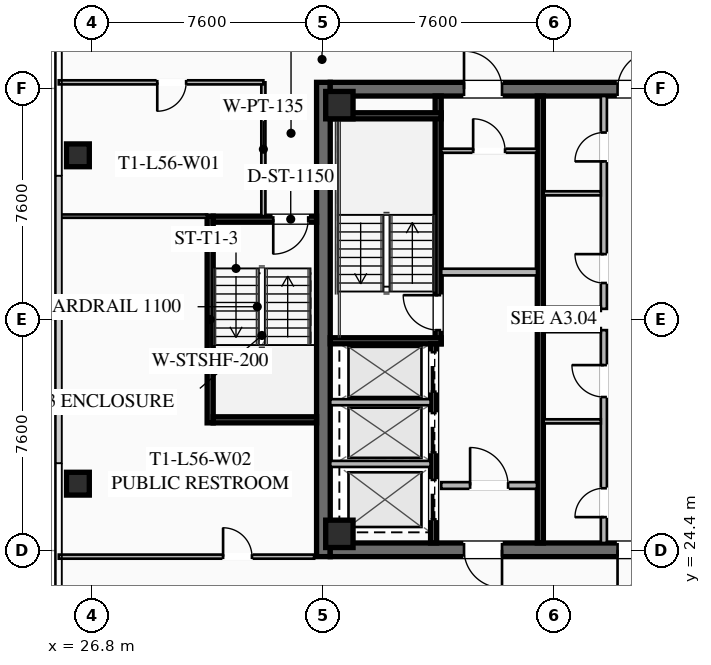
"""IFC4 building model, lengths in metres.
Left out: names, types, materials, properties, quantities, classifications, styles, units other than length and angle.
Written with IfcOpenShell. Run it as: python <this file> out.ifc"""

import sys

from ifc_helpers import new_model, si_unit, direction, frame, frame_2d, origin, origin_2d, place, context, subcontext, project, spatial, rectangle, hollow_rectangle, extrude, element, fill, save


model = new_model("IFC4")
c1 = context("Model", 3, precision=1e-05, world=origin(), true_north=direction((0.0, 1.0)))
c2 = subcontext(c1, "Body", "Model", "MODEL_VIEW")
j1 = project(units=[si_unit("LENGTHUNIT", "METRE"), si_unit("PLANEANGLEUNIT", "RADIAN")], contexts=[c1])
p1 = place(None, origin())
s1 = spatial("IfcSite", under=j1, at=p1, CompositionType="ELEMENT")
p2 = place(p1, origin())
s2 = spatial("IfcBuilding", under=s1, at=p2, CompositionType="ELEMENT")
p3 = place(p2, frame((0.0, 0.0, 207.75)))
s3 = spatial("IfcBuildingStorey", under=s2, at=p3, CompositionType="ELEMENT", Elevation=207.75)
p4 = place(p3, frame((34.425, 24.2, 0.0), z_axis=(0.0, 0.0, 1.0), x_axis=(0.0, 1.0, 0.0)))
e1 = element("IfcWall", 1, at=p4, inside=s3, PredefinedType="SHEAR", context=c2, shape_type="SweptSolid", body=[
    extrude(rectangle(XDim=15.6, YDim=0.45, at=frame_2d((7.8, 0.0))), origin(), (0.0, 0.0, 1.0), 3.55),
])
p5 = place(p3, frame((49.35, 24.425, 0.0), z_axis=(0.0, 0.0, 1.0), x_axis=(-1.0, 0.0, 0.0)))
e2 = element("IfcWall", 2, at=p5, inside=s3, PredefinedType="SHEAR", context=c2, shape_type="SweptSolid", body=[
    extrude(rectangle(XDim=14.7, YDim=0.45, at=frame_2d((7.35, 0.0))), origin(), (0.0, 0.0, 1.0), 3.55),
])
p6 = place(p5, frame((9.05, 0.0, 0.0)))
e3 = element("IfcOpeningElement", 3, at=p6, cuts=e2, PredefinedType="OPENING", context=c2, shape_type="SweptSolid", body=[
    extrude(rectangle(XDim=1.25, YDim=2.25, at=frame_2d((0.625, 1.125))), frame((0.0, 0.235, 0.0), z_axis=(0.0, -1.0, 0.0), x_axis=(1.0, 0.0, 0.0)), (0.0, 0.0, 1.0), 0.47),
])
p7 = place(p5, frame((4.0, 0.0, 0.0)))
e4 = element("IfcOpeningElement", 4, at=p7, cuts=e2, PredefinedType="OPENING", context=c2, shape_type="SweptSolid", body=[
    extrude(rectangle(XDim=1.25, YDim=2.25, at=frame_2d((0.625, 1.125))), frame((0.0, 0.235, 0.0), z_axis=(0.0, -1.0, 0.0), x_axis=(1.0, 0.0, 0.0)), (0.0, 0.0, 1.0), 0.47),
])
p8 = place(p3, frame((34.65, 39.575, 0.0), z_axis=(0.0, 0.0, 1.0), x_axis=(1.0, 0.0, 0.0)))
e5 = element("IfcWall", 5, at=p8, inside=s3, PredefinedType="SHEAR", context=c2, shape_type="SweptSolid", body=[
    extrude(rectangle(XDim=14.7, YDim=0.45, at=frame_2d((7.35, 0.0))), origin(), (0.0, 0.0, 1.0), 3.55),
])
p9 = place(p8, frame((4.4, 0.0, 0.0)))
e6 = element("IfcOpeningElement", 6, at=p9, cuts=e5, PredefinedType="OPENING", context=c2, shape_type="SweptSolid", body=[
    extrude(rectangle(XDim=1.25, YDim=2.25, at=frame_2d((0.625, 1.125))), frame((0.0, 0.235, 0.0), z_axis=(0.0, -1.0, 0.0), x_axis=(1.0, 0.0, 0.0)), (0.0, 0.0, 1.0), 0.47),
])
p10 = place(p8, frame((9.45, 0.0, 0.0)))
e7 = element("IfcOpeningElement", 7, at=p10, cuts=e5, PredefinedType="OPENING", context=c2, shape_type="SweptSolid", body=[
    extrude(rectangle(XDim=1.25, YDim=2.25, at=frame_2d((0.625, 1.125))), frame((0.0, 0.235, 0.0), z_axis=(0.0, -1.0, 0.0), x_axis=(1.0, 0.0, 0.0)), (0.0, 0.0, 1.0), 0.47),
])
for number, where, z_axis, x_axis in (
    (8, (34.95, 24.95, 0.0), (0.0, 0.0, 1.0), (1.0, 0.0, 0.0)),
    (9, (34.95, 39.05, 0.0), (0.0, 0.0, 1.0), (1.0, 0.0, 0.0)),
):
    element("IfcColumn", number, at=place(p3, frame(where, z_axis=z_axis, x_axis=x_axis)), inside=s3, PredefinedType="COLUMN", context=c2, shape_type="SweptSolid", body=[
        extrude(hollow_rectangle(XDim=0.9, YDim=0.9, WallThickness=0.04, at=origin_2d()), origin(), (0.0, 0.0, 1.0), 3.37),
    ])
for number, where, z_axis, x_axis in (
    (10, (26.35, 37.4, 0.0), (0.0, 0.0, 1.0), (1.0, 0.0, 0.0)),
    (11, (26.35, 26.6, 0.0), (0.0, 0.0, 1.0), (1.0, 0.0, 0.0)),
):
    element("IfcColumn", number, at=place(p3, frame(where, z_axis=z_axis, x_axis=x_axis)), inside=s3, PredefinedType="COLUMN", context=c2, shape_type="SweptSolid", body=[
        extrude(hollow_rectangle(XDim=0.75, YDim=0.75, WallThickness=0.032, at=origin_2d()), origin(), (0.0, 0.0, 1.0), 3.37),
    ])
p11 = place(p3, frame((38.2, 31.2, 0.0), z_axis=(0.0, 0.0, 1.0), x_axis=(0.0, 1.0, 0.0)))
e12 = element("IfcWall", 12, at=p11, inside=s3, PredefinedType="SHEAR", context=c2, shape_type="SweptSolid", body=[
    extrude(rectangle(XDim=8.15, YDim=0.2, at=frame_2d((4.075, 0.0))), origin(), (0.0, 0.0, 1.0), 3.37),
])
p12 = place(p11, frame((0.45, 0.0, 0.0)))
e13 = element("IfcOpeningElement", 13, at=p12, cuts=e12, PredefinedType="OPENING", context=c2, shape_type="SweptSolid", body=[
    extrude(rectangle(XDim=1.15, YDim=2.2, at=frame_2d((0.575, 1.1))), frame((0.0, 0.11, 0.0), z_axis=(0.0, -1.0, 0.0), x_axis=(1.0, 0.0, 0.0)), (0.0, 0.0, 1.0), 0.22),
])
for number, where, z_axis, x_axis in (
    (14, (34.65, 31.3, 0.0), (0.0, 0.0, 1.0), (1.0, 0.0, 0.0)),
    (15, (34.65, 38.7, 0.0), (0.0, 0.0, 1.0), (1.0, 0.0, 0.0)),
):
    element("IfcWall", number, at=place(p3, frame(where, z_axis=z_axis, x_axis=x_axis)), inside=s3, PredefinedType="SHEAR", context=c2, shape_type="SweptSolid", body=[
        extrude(rectangle(XDim=3.65, YDim=0.2, at=frame_2d((1.825, 0.0))), origin(), (0.0, 0.0, 1.0), 3.37),
    ])
p13 = place(p3, frame((41.56, 24.65, 0.0), z_axis=(0.0, 0.0, 1.0), x_axis=(0.0, 1.0, 0.0)))
e16 = element("IfcWall", 16, at=p13, inside=s3, PredefinedType="SHEAR", context=c2, shape_type="SweptSolid", body=[
    extrude(rectangle(XDim=14.7, YDim=0.2, at=frame_2d((7.35, 0.0))), origin(), (0.0, 0.0, 1.0), 3.37),
])
p14 = place(p3, frame((38.3, 33.56, 0.0), z_axis=(0.0, 0.0, 1.0), x_axis=(1.0, 0.0, 0.0)))
e17 = element("IfcWall", 17, at=p14, inside=s3, PredefinedType="SOLIDWALL", context=c2, shape_type="SweptSolid", body=[
    extrude(rectangle(XDim=3.15, YDim=0.22, at=frame_2d((1.575, 0.0))), origin(), (0.0, 0.0, 1.0), 2.723),
])
p15 = place(p3, frame((38.3, 26.54, 0.0), z_axis=(0.0, 0.0, 1.0), x_axis=(1.0, 0.0, 0.0)))
e18 = element("IfcWall", 18, at=p15, inside=s3, PredefinedType="SOLIDWALL", context=c2, shape_type="SweptSolid", body=[
    extrude(rectangle(XDim=3.15, YDim=0.22, at=frame_2d((1.575, 0.0))), origin(), (0.0, 0.0, 1.0), 2.723),
])
p16 = place(p15, frame((0.95, 0.0, 0.0)))
e19 = element("IfcOpeningElement", 19, at=p16, cuts=e18, PredefinedType="OPENING", context=c2, shape_type="SweptSolid", body=[
    extrude(rectangle(XDim=1.25, YDim=2.25, at=frame_2d((0.625, 1.125))), frame((0.0, 0.12, 0.0), z_axis=(0.0, -1.0, 0.0), x_axis=(1.0, 0.0, 0.0)), (0.0, 0.0, 1.0), 0.24),
])
p17 = place(p3, frame((38.05, 24.65, 0.0), z_axis=(0.0, 0.0, 1.0), x_axis=(0.0, 1.0, 0.0)))
e20 = element("IfcWall", 20, at=p17, inside=s3, PredefinedType="SHEAR", context=c2, shape_type="SweptSolid", body=[
    extrude(rectangle(XDim=6.55, YDim=0.2, at=frame_2d((3.275, 0.0))), origin(), (0.0, 0.0, 1.0), 3.37),
])
p18 = place(p17, frame((4.975, 0.0, 0.0)))
e21 = element("IfcOpeningElement", 21, at=p18, cuts=e20, PredefinedType="OPENING", context=c2, shape_type="SweptSolid", body=[
    extrude(rectangle(XDim=1.3, YDim=2.25, at=frame_2d((0.65, 1.125))), frame((0.0, 0.11, 0.0), z_axis=(0.0, -1.0, 0.0), x_axis=(1.0, 0.0, 0.0)), (0.0, 0.0, 1.0), 0.22),
])
p19 = place(p17, frame((2.975, 0.0, 0.0)))
e22 = element("IfcOpeningElement", 22, at=p19, cuts=e20, PredefinedType="OPENING", context=c2, shape_type="SweptSolid", body=[
    extrude(rectangle(XDim=1.3, YDim=2.25, at=frame_2d((0.65, 1.125))), frame((0.0, 0.11, 0.0), z_axis=(0.0, -1.0, 0.0), x_axis=(1.0, 0.0, 0.0)), (0.0, 0.0, 1.0), 0.22),
])
p20 = place(p17, frame((0.775, 0.0, 0.0)))
e23 = element("IfcOpeningElement", 23, at=p20, cuts=e20, PredefinedType="OPENING", context=c2, shape_type="SweptSolid", body=[
    extrude(rectangle(XDim=1.3, YDim=2.25, at=frame_2d((0.65, 1.125))), frame((0.0, 0.11, 0.0), z_axis=(0.0, -1.0, 0.0), x_axis=(1.0, 0.0, 0.0)), (0.0, 0.0, 1.0), 0.22),
])
for number, where, z_axis, x_axis in (
    (24, (34.65, 27.25, 0.0), (0.0, 0.0, 1.0), (1.0, 0.0, 0.0)),
    (25, (34.65, 29.28, 0.0), (0.0, 0.0, 1.0), (1.0, 0.0, 0.0)),
):
    element("IfcWall", number, at=place(p3, frame(where, z_axis=z_axis, x_axis=x_axis)), inside=s3, PredefinedType="SOLIDWALL", context=c2, shape_type="SweptSolid", body=[
        extrude(rectangle(XDim=3.3, YDim=0.2, at=frame_2d((1.65, 0.0))), origin(), (0.0, 0.0, 1.0), 3.37),
    ])
p21 = place(p3, frame((38.3, 37.55, 0.0), z_axis=(0.0, 0.0, 1.0), x_axis=(1.0, 0.0, 0.0)))
e26 = element("IfcWall", 26, at=p21, inside=s3, PredefinedType="PARTITIONING", context=c2, shape_type="SweptSolid", body=[
    extrude(rectangle(XDim=3.15, YDim=0.135, at=frame_2d((1.575, 0.0))), origin(), (0.0, 0.0, 1.0), 2.723),
])
p22 = place(p21, frame((1.05, 0.0, 0.0)))
e27 = element("IfcOpeningElement", 27, at=p22, cuts=e26, PredefinedType="OPENING", context=c2, shape_type="SweptSolid", body=[
    extrude(rectangle(XDim=1.05, YDim=2.2, at=frame_2d((0.525, 1.1))), frame((0.0, 0.077, 0.0), z_axis=(0.0, -1.0, 0.0), x_axis=(1.0, 0.0, 0.0)), (0.0, 0.0, 1.0), 0.155),
])
p23 = place(p3, frame((43.65, 24.65, 0.0), z_axis=(0.0, 0.0, 1.0), x_axis=(0.0, 1.0, 0.0)))
e28 = element("IfcWall", 28, at=p23, inside=s3, PredefinedType="SOLIDWALL", context=c2, shape_type="SweptSolid", body=[
    extrude(rectangle(XDim=7.0, YDim=0.2, at=frame_2d((3.5, 0.0))), origin(), (0.0, 0.0, 1.0), 2.723),
])
p24 = place(p23, frame((0.85, 0.0, 0.0)))
e29 = element("IfcOpeningElement", 29, at=p24, cuts=e28, PredefinedType="OPENING", context=c2, shape_type="SweptSolid", body=[
    extrude(rectangle(XDim=0.95, YDim=2.05, at=frame_2d((0.475, 1.025))), frame((0.0, 0.11, 0.0), z_axis=(0.0, -1.0, 0.0), x_axis=(1.0, 0.0, 0.0)), (0.0, 0.0, 1.0), 0.22),
])
p25 = place(p23, frame((4.8, 0.0, 0.0)))
e30 = element("IfcOpeningElement", 30, at=p25, cuts=e28, PredefinedType="OPENING", context=c2, shape_type="SweptSolid", body=[
    extrude(rectangle(XDim=1.05, YDim=2.2, at=frame_2d((0.525, 1.1))), frame((0.0, 0.11, 0.0), z_axis=(0.0, -1.0, 0.0), x_axis=(1.0, 0.0, 0.0)), (0.0, 0.0, 1.0), 0.22),
])
for number, where, z_axis, x_axis in (
    (31, (41.67, 31.65, 0.0), (0.0, 0.0, 1.0), (1.0, 0.0, 0.0)),
    (32, (41.67, 28.65, 0.0), (0.0, 0.0, 1.0), (1.0, 0.0, 0.0)),
):
    element("IfcWall", number, at=place(p3, frame(where, z_axis=z_axis, x_axis=x_axis)), inside=s3, PredefinedType="PARTITIONING", context=c2, shape_type="SweptSolid", body=[
        extrude(rectangle(XDim=1.88, YDim=0.135, at=frame_2d((0.94, 0.0))), origin(), (0.0, 0.0, 1.0), 2.723),
    ])
p26 = place(p3, frame((43.65, 32.35, 0.0), z_axis=(0.0, 0.0, 1.0), x_axis=(0.0, 1.0, 0.0)))
e33 = element("IfcWall", 33, at=p26, inside=s3, PredefinedType="SOLIDWALL", context=c2, shape_type="SweptSolid", body=[
    extrude(rectangle(XDim=7.0, YDim=0.2, at=frame_2d((3.5, 0.0))), origin(), (0.0, 0.0, 1.0), 2.723),
])
p27 = place(p26, frame((0.85, 0.0, 0.0)))
e34 = element("IfcOpeningElement", 34, at=p27, cuts=e33, PredefinedType="OPENING", context=c2, shape_type="SweptSolid", body=[
    extrude(rectangle(XDim=0.95, YDim=2.05, at=frame_2d((0.475, 1.025))), frame((0.0, 0.11, 0.0), z_axis=(0.0, -1.0, 0.0), x_axis=(1.0, 0.0, 0.0)), (0.0, 0.0, 1.0), 0.22),
])
p28 = place(p26, frame((4.85, 0.0, 0.0)))
e35 = element("IfcOpeningElement", 35, at=p28, cuts=e33, PredefinedType="OPENING", context=c2, shape_type="SweptSolid", body=[
    extrude(rectangle(XDim=0.95, YDim=2.05, at=frame_2d((0.475, 1.025))), frame((0.0, 0.11, 0.0), z_axis=(0.0, -1.0, 0.0), x_axis=(1.0, 0.0, 0.0)), (0.0, 0.0, 1.0), 0.22),
])
for number, where, z_axis, x_axis in (
    (36, (41.67, 32.35, 0.0), (0.0, 0.0, 1.0), (1.0, 0.0, 0.0)),
    (37, (41.67, 36.15, 0.0), (0.0, 0.0, 1.0), (1.0, 0.0, 0.0)),
):
    element("IfcWall", number, at=place(p3, frame(where, z_axis=z_axis, x_axis=x_axis)), inside=s3, PredefinedType="PARTITIONING", context=c2, shape_type="SweptSolid", body=[
        extrude(rectangle(XDim=1.88, YDim=0.135, at=frame_2d((0.94, 0.0))), origin(), (0.0, 0.0, 1.0), 2.723),
    ])
p29 = place(p3, frame((30.7, 28.6, 0.0), z_axis=(0.0, 0.0, 1.0), x_axis=(0.0, 1.0, 0.0)))
e38 = element("IfcWall", 38, at=p29, inside=s3, PredefinedType="SHEAR", context=c2, shape_type="SweptSolid", body=[
    extrude(rectangle(XDim=6.8, YDim=0.2, at=frame_2d((3.4, 0.0))), origin(), (0.0, 0.0, 1.0), 3.37),
])
p30 = place(p3, frame((34.2, 35.3, 0.0), z_axis=(0.0, 0.0, 1.0), x_axis=(-1.0, 0.0, 0.0)))
e39 = element("IfcWall", 39, at=p30, inside=s3, PredefinedType="SHEAR", context=c2, shape_type="SweptSolid", body=[
    extrude(rectangle(XDim=3.4, YDim=0.2, at=frame_2d((1.7, 0.0))), origin(), (0.0, 0.0, 1.0), 3.37),
])
p31 = place(p30, frame((0.275, 0.0, 0.0)))
e40 = element("IfcOpeningElement", 40, at=p31, cuts=e39, PredefinedType="OPENING", context=c2, shape_type="SweptSolid", body=[
    extrude(rectangle(XDim=1.15, YDim=2.2, at=frame_2d((0.575, 1.1))), frame((0.0, 0.11, 0.0), z_axis=(0.0, -1.0, 0.0), x_axis=(1.0, 0.0, 0.0)), (0.0, 0.0, 1.0), 0.22),
])
p32 = place(p3, frame((30.8, 28.7, 0.0), z_axis=(0.0, 0.0, 1.0), x_axis=(1.0, 0.0, 0.0)))
e41 = element("IfcWall", 41, at=p32, inside=s3, PredefinedType="SHEAR", context=c2, shape_type="SweptSolid", body=[
    extrude(rectangle(XDim=3.4, YDim=0.2, at=frame_2d((1.7, 0.0))), origin(), (0.0, 0.0, 1.0), 3.37),
])
p33 = place(p3, frame((32.45, 35.4, 0.0), z_axis=(0.0, 0.0, 1.0), x_axis=(0.0, 1.0, 0.0)))
e42 = element("IfcWall", 42, at=p33, inside=s3, PredefinedType="PARTITIONING", context=c2, shape_type="SweptSolid", body=[
    extrude(rectangle(XDim=4.4, YDim=0.135, at=frame_2d((2.2, 0.0))), origin(), (0.0, 0.0, 1.0), 2.723),
])
p34 = place(p3, frame((32.45, 39.8, 0.0), z_axis=(0.0, 0.0, 1.0), x_axis=(-1.0, 0.0, 0.0)))
e43 = element("IfcWall", 43, at=p34, inside=s3, PredefinedType="PARTITIONING", context=c2, shape_type="SweptSolid", body=[
    extrude(rectangle(XDim=6.73, YDim=0.135, at=frame_2d((3.365, 0.0))), origin(), (0.0, 0.0, 1.0), 2.723),
])
p35 = place(p34, frame((2.54, 0.0, 0.0)))
e44 = element("IfcOpeningElement", 44, at=p35, cuts=e43, PredefinedType="OPENING", context=c2, shape_type="SweptSolid", body=[
    extrude(rectangle(XDim=0.95, YDim=2.05, at=frame_2d((0.475, 1.025))), frame((0.0, 0.077, 0.0), z_axis=(0.0, -1.0, 0.0), x_axis=(1.0, 0.0, 0.0)), (0.0, 0.0, 1.0), 0.155),
])
p36 = place(p3, frame((25.72, 24.2, 0.0), z_axis=(0.0, 0.0, 1.0), x_axis=(1.0, 0.0, 0.0)))
e45 = element("IfcWall", 45, at=p36, inside=s3, PredefinedType="PARTITIONING", context=c2, shape_type="SweptSolid", body=[
    extrude(rectangle(XDim=8.4, YDim=0.135, at=frame_2d((4.2, 0.0))), origin(), (0.0, 0.0, 1.0), 2.723),
])
p37 = place(p36, frame((5.405, 0.0, 0.0)))
e46 = element("IfcOpeningElement", 46, at=p37, cuts=e45, PredefinedType="OPENING", context=c2, shape_type="SweptSolid", body=[
    extrude(rectangle(XDim=0.95, YDim=2.05, at=frame_2d((0.475, 1.025))), frame((0.0, 0.077, 0.0), z_axis=(0.0, -1.0, 0.0), x_axis=(1.0, 0.0, 0.0)), (0.0, 0.0, 1.0), 0.155),
])
p38 = place(p3, frame((30.6, 35.4, 0.0), z_axis=(0.0, 0.0, 1.0), x_axis=(-1.0, 0.0, 0.0)))
e47 = element("IfcWall", 47, at=p38, inside=s3, PredefinedType="PARTITIONING", context=c2, shape_type="SweptSolid", body=[
    extrude(rectangle(XDim=4.88, YDim=0.11, at=frame_2d((2.44, 0.0))), origin(), (0.0, 0.0, 1.0), 2.723),
])
p39 = place(p9, origin())
e48 = element("IfcDoor", 48, at=p39, inside=s3, OperationType="SINGLE_SWING_LEFT", PredefinedType="DOOR", context=c2, shape_type="SweptSolid", body=[
    extrude(rectangle(XDim=1.25, YDim=2.25, at=frame_2d((0.625, 1.125))), frame((0.0, 0.025, 0.0), z_axis=(0.0, -1.0, 0.0), x_axis=(1.0, 0.0, 0.0)), (0.0, 0.0, 1.0), 0.05),
])
fill(e6, e48)
p40 = place(p10, origin())
e49 = element("IfcDoor", 49, at=p40, inside=s3, OperationType="SINGLE_SWING_RIGHT", PredefinedType="DOOR", context=c2, shape_type="SweptSolid", body=[
    extrude(rectangle(XDim=1.25, YDim=2.25, at=frame_2d((0.625, 1.125))), frame((0.0, 0.025, 0.0), z_axis=(0.0, -1.0, 0.0), x_axis=(1.0, 0.0, 0.0)), (0.0, 0.0, 1.0), 0.05),
])
fill(e7, e49)
p41 = place(p6, origin())
e50 = element("IfcDoor", 50, at=p41, inside=s3, OperationType="SINGLE_SWING_LEFT", PredefinedType="DOOR", context=c2, shape_type="SweptSolid", body=[
    extrude(rectangle(XDim=1.25, YDim=2.25, at=frame_2d((0.625, 1.125))), frame((0.0, 0.025, 0.0), z_axis=(0.0, -1.0, 0.0), x_axis=(1.0, 0.0, 0.0)), (0.0, 0.0, 1.0), 0.05),
])
fill(e3, e50)
p42 = place(p7, origin())
e51 = element("IfcDoor", 51, at=p42, inside=s3, OperationType="SINGLE_SWING_RIGHT", PredefinedType="DOOR", context=c2, shape_type="SweptSolid", body=[
    extrude(rectangle(XDim=1.25, YDim=2.25, at=frame_2d((0.625, 1.125))), frame((0.0, 0.025, 0.0), z_axis=(0.0, -1.0, 0.0), x_axis=(1.0, 0.0, 0.0)), (0.0, 0.0, 1.0), 0.05),
])
fill(e4, e51)
p43 = place(p12, origin())
e52 = element("IfcDoor", 52, at=p43, inside=s3, OperationType="SINGLE_SWING_RIGHT", PredefinedType="DOOR", context=c2, shape_type="SweptSolid", body=[
    extrude(rectangle(XDim=1.15, YDim=2.2, at=frame_2d((0.575, 1.1))), frame((0.0, 0.025, 0.0), z_axis=(0.0, -1.0, 0.0), x_axis=(1.0, 0.0, 0.0)), (0.0, 0.0, 1.0), 0.05),
])
fill(e13, e52)
p44 = place(p16, origin())
e53 = element("IfcDoor", 53, at=p44, inside=s3, OperationType="SINGLE_SWING_LEFT", PredefinedType="DOOR", context=c2, shape_type="SweptSolid", body=[
    extrude(rectangle(XDim=1.25, YDim=2.25, at=frame_2d((0.625, 1.125))), frame((0.0, 0.025, 0.0), z_axis=(0.0, -1.0, 0.0), x_axis=(1.0, 0.0, 0.0)), (0.0, 0.0, 1.0), 0.05),
])
fill(e19, e53)
p45 = place(p22, origin())
e54 = element("IfcDoor", 54, at=p45, inside=s3, OperationType="SINGLE_SWING_LEFT", PredefinedType="DOOR", context=c2, shape_type="SweptSolid", body=[
    extrude(rectangle(XDim=1.05, YDim=2.2, at=frame_2d((0.525, 1.1))), frame((0.0, 0.025, 0.0), z_axis=(0.0, -1.0, 0.0), x_axis=(1.0, 0.0, 0.0)), (0.0, 0.0, 1.0), 0.05),
])
fill(e27, e54)
p46 = place(p24, origin())
e55 = element("IfcDoor", 55, at=p46, inside=s3, OperationType="SINGLE_SWING_LEFT", PredefinedType="DOOR", context=c2, shape_type="SweptSolid", body=[
    extrude(rectangle(XDim=0.95, YDim=2.05, at=frame_2d((0.475, 1.025))), frame((0.0, 0.025, 0.0), z_axis=(0.0, -1.0, 0.0), x_axis=(1.0, 0.0, 0.0)), (0.0, 0.0, 1.0), 0.05),
])
fill(e29, e55)
p47 = place(p25, origin())
e56 = element("IfcDoor", 56, at=p47, inside=s3, OperationType="SINGLE_SWING_RIGHT", PredefinedType="DOOR", context=c2, shape_type="SweptSolid", body=[
    extrude(rectangle(XDim=1.05, YDim=2.2, at=frame_2d((0.525, 1.1))), frame((0.0, 0.025, 0.0), z_axis=(0.0, -1.0, 0.0), x_axis=(1.0, 0.0, 0.0)), (0.0, 0.0, 1.0), 0.05),
])
fill(e30, e56)
p48 = place(p27, origin())
e57 = element("IfcDoor", 57, at=p48, inside=s3, OperationType="SINGLE_SWING_RIGHT", PredefinedType="DOOR", context=c2, shape_type="SweptSolid", body=[
    extrude(rectangle(XDim=0.95, YDim=2.05, at=frame_2d((0.475, 1.025))), frame((0.0, 0.025, 0.0), z_axis=(0.0, -1.0, 0.0), x_axis=(1.0, 0.0, 0.0)), (0.0, 0.0, 1.0), 0.05),
])
fill(e34, e57)
p49 = place(p28, origin())
e58 = element("IfcDoor", 58, at=p49, inside=s3, OperationType="SINGLE_SWING_LEFT", PredefinedType="DOOR", context=c2, shape_type="SweptSolid", body=[
    extrude(rectangle(XDim=0.95, YDim=2.05, at=frame_2d((0.475, 1.025))), frame((0.0, 0.025, 0.0), z_axis=(0.0, -1.0, 0.0), x_axis=(1.0, 0.0, 0.0)), (0.0, 0.0, 1.0), 0.05),
])
fill(e35, e58)
p50 = place(p31, origin())
e59 = element("IfcDoor", 59, at=p50, inside=s3, OperationType="SINGLE_SWING_RIGHT", PredefinedType="DOOR", context=c2, shape_type="SweptSolid", body=[
    extrude(rectangle(XDim=1.15, YDim=2.2, at=frame_2d((0.575, 1.1))), frame((0.0, 0.025, 0.0), z_axis=(0.0, -1.0, 0.0), x_axis=(1.0, 0.0, 0.0)), (0.0, 0.0, 1.0), 0.05),
])
fill(e40, e59)
p51 = place(p35, origin())
e60 = element("IfcDoor", 60, at=p51, inside=s3, OperationType="SINGLE_SWING_RIGHT", PredefinedType="DOOR", context=c2, shape_type="SweptSolid", body=[
    extrude(rectangle(XDim=0.95, YDim=2.05, at=frame_2d((0.475, 1.025))), frame((0.0, 0.025, 0.0), z_axis=(0.0, -1.0, 0.0), x_axis=(1.0, 0.0, 0.0)), (0.0, 0.0, 1.0), 0.05),
])
fill(e44, e60)
p52 = place(p37, origin())
e61 = element("IfcDoor", 61, at=p52, inside=s3, OperationType="SINGLE_SWING_LEFT", PredefinedType="DOOR", context=c2, shape_type="SweptSolid", body=[
    extrude(rectangle(XDim=0.95, YDim=2.05, at=frame_2d((0.475, 1.025))), frame((0.0, 0.025, 0.0), z_axis=(0.0, -1.0, 0.0), x_axis=(1.0, 0.0, 0.0)), (0.0, 0.0, 1.0), 0.05),
])
fill(e46, e61)
p53 = place(p18, origin())
e62 = element("IfcDoor", 62, at=p53, inside=s3, OperationType="SLIDING_TO_LEFT", PredefinedType="DOOR", context=c2, shape_type="SweptSolid", body=[
    extrude(rectangle(XDim=1.3, YDim=2.25, at=frame_2d((0.65, 1.125))), frame((0.0, 0.025, 0.0), z_axis=(0.0, -1.0, 0.0), x_axis=(1.0, 0.0, 0.0)), (0.0, 0.0, 1.0), 0.05),
])
fill(e21, e62)
p54 = place(p19, origin())
e63 = element("IfcDoor", 63, at=p54, inside=s3, OperationType="SLIDING_TO_LEFT", PredefinedType="DOOR", context=c2, shape_type="SweptSolid", body=[
    extrude(rectangle(XDim=1.3, YDim=2.25, at=frame_2d((0.65, 1.125))), frame((0.0, 0.025, 0.0), z_axis=(0.0, -1.0, 0.0), x_axis=(1.0, 0.0, 0.0)), (0.0, 0.0, 1.0), 0.05),
])
fill(e22, e63)
p55 = place(p20, origin())
e64 = element("IfcDoor", 64, at=p55, inside=s3, OperationType="SLIDING_TO_LEFT", PredefinedType="DOOR", context=c2, shape_type="SweptSolid", body=[
    extrude(rectangle(XDim=1.3, YDim=2.25, at=frame_2d((0.65, 1.125))), frame((0.0, 0.025, 0.0), z_axis=(0.0, -1.0, 0.0), x_axis=(1.0, 0.0, 0.0)), (0.0, 0.0, 1.0), 0.05),
])
fill(e23, e64)
save(model, sys.argv[1])
